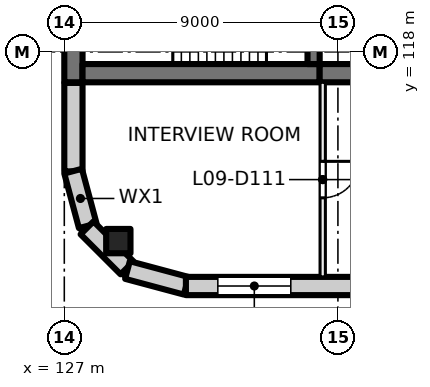
"""IFC4 building model, lengths in metres.
Left out: names, types, materials, properties, quantities, classifications, styles, units other than length and angle.
Written with IfcOpenShell. Run it as: python <this file> out.ifc"""

import sys

from ifc_helpers import new_model, si_unit, direction, frame, frame_2d, origin, origin_2d, place, context, subcontext, project, spatial, rectangle, extrude, element, fill, save


model = new_model("IFC4")
c1 = context("Model", 3, precision=1e-05, world=origin(), true_north=direction((0.0, 1.0)))
c2 = subcontext(c1, "Body", "Model", "MODEL_VIEW")
j1 = project(units=[si_unit("LENGTHUNIT", "METRE"), si_unit("PLANEANGLEUNIT", "RADIAN")], contexts=[c1])
p1 = place(None, origin())
s1 = spatial("IfcSite", under=j1, at=p1, CompositionType="ELEMENT")
p2 = place(p1, origin())
s2 = spatial("IfcBuilding", under=s1, at=p2, CompositionType="ELEMENT")
p3 = place(p2, frame((0.0, 0.0, 43.5)))
s3 = spatial("IfcBuildingStorey", under=s2, at=p3, CompositionType="ELEMENT", Elevation=43.5)
p4 = place(p3, frame((128.777, 111.777, 0.0), z_axis=(0.0, 0.0, 1.0), x_axis=(1.0, 0.0, 0.0)))
e1 = element("IfcColumn", 1, at=p4, inside=s3, PredefinedType="COLUMN", context=c2, shape_type="SweptSolid", body=[
    extrude(rectangle(XDim=0.8, YDim=0.8, at=origin_2d()), origin(), (0.0, 0.0, 1.0), 4.0),
])
p5 = place(p3, frame((127.3, 117.0, 0.0), z_axis=(0.0, 0.0, 1.0), x_axis=(0.0, 1.0, 0.0)))
e2 = element("IfcWall", 2, at=p5, inside=s3, PredefinedType="SHEAR", context=c2, shape_type="SweptSolid", body=[
    extrude(rectangle(XDim=3.8, YDim=0.6, at=frame_2d((1.9, 0.0))), origin(), (0.0, 0.0, 1.0), 4.0),
])
p6 = place(p3, frame((127.6, 117.3, 0.0), z_axis=(0.0, 0.0, 1.0), x_axis=(1.0, 0.0, 0.0)))
e3 = element("IfcWall", 3, at=p6, inside=s3, PredefinedType="SHEAR", context=c2, shape_type="SweptSolid", body=[
    extrude(rectangle(XDim=7.8, YDim=0.6, at=frame_2d((3.9, 0.0))), origin(), (0.0, 0.0, 1.0), 4.0),
])
p7 = place(p3, frame((135.4, 117.3, 0.0), z_axis=(0.0, 0.0, 1.0), x_axis=(1.0, 0.0, 0.0)))
e4 = element("IfcWall", 4, at=p7, inside=s3, PredefinedType="SHEAR", context=c2, shape_type="SweptSolid", body=[
    extrude(rectangle(XDim=4.6, YDim=0.6, at=frame_2d((2.3, 0.0))), origin(), (0.0, 0.0, 1.0), 4.0),
])
p8 = place(p3, frame((135.2, 117.6, 0.0), z_axis=(0.0, 0.0, 1.0), x_axis=(0.0, 1.0, 0.0)))
e5 = element("IfcWall", 5, at=p8, inside=s3, PredefinedType="SHEAR", context=c2, shape_type="SweptSolid", body=[
    extrude(rectangle(XDim=2.8, YDim=0.4, at=frame_2d((1.4, 0.0))), origin(), (0.0, 0.0, 1.0), 4.0),
])
p9 = place(p8, frame((0.9, 0.0, 0.0)))
e6 = element("IfcOpeningElement", 6, at=p9, cuts=e5, PredefinedType="OPENING", context=c2, shape_type="SweptSolid", body=[
    extrude(rectangle(XDim=1.0, YDim=2.1, at=frame_2d((0.5, 1.05))), frame((0.0, 0.21, 0.0), z_axis=(0.0, -1.0, 0.0), x_axis=(1.0, 0.0, 0.0)), (0.0, 0.0, 1.0), 0.42),
])
p10 = place(p3, frame((127.3, 114.07, 0.0), z_axis=(0.0, 0.0, 1.0), x_axis=(0.0, 1.0, 0.0)))
e7 = element("IfcWall", 7, at=p10, inside=s3, PredefinedType="SOLIDWALL", context=c2, shape_type="SweptSolid", body=[
    extrude(rectangle(XDim=2.91, YDim=0.6, at=frame_2d((1.455, 0.0))), origin(), (0.0, 0.0, 1.0), 3.625),
])
for number, where, z_axis, x_axis in (
    (8, (127.771, 112.281, 0.0), (0.0, 0.0, 1.0), (-0.259, 0.966, 0.0)),
    (9, (129.064, 110.896, 0.0), (0.0, 0.0, 1.0), (-0.707, 0.707, 0.0)),
):
    element("IfcWall", number, at=place(p3, frame(where, z_axis=z_axis, x_axis=x_axis)), inside=s3, PredefinedType="SOLIDWALL", context=c2, shape_type="SweptSolid", body=[
        extrude(rectangle(XDim=1.861, YDim=0.6, at=frame_2d((0.93, 0.0))), origin(), (0.0, 0.0, 1.0), 3.625),
    ])
p11 = place(p3, frame((131.01, 110.308, 0.0), z_axis=(0.0, 0.0, 1.0), x_axis=(-0.965920269068, 0.258839784042, 0.0)))
e10 = element("IfcWall", 10, at=p11, inside=s3, PredefinedType="SOLIDWALL", context=c2, shape_type="SweptSolid", body=[
    extrude(rectangle(XDim=2.0, YDim=0.6, at=frame_2d((1.0, 0.0))), origin(), (0.0, 0.0, 1.0), 3.625),
])
p12 = place(p3, frame((162.93, 110.3, 0.0), z_axis=(0.0, 0.0, 1.0), x_axis=(-1.0, 0.0, 0.0)))
e11 = element("IfcWall", 11, at=p12, inside=s3, PredefinedType="SOLIDWALL", context=c2, shape_type="SweptSolid", body=[
    extrude(rectangle(XDim=31.93, YDim=0.6, at=frame_2d((15.965, 0.0))), origin(), (0.0, 0.0, 1.0), 3.625),
])
p13 = place(p12, frame((1.48, 0.0, 0.9)))
e12 = element("IfcOpeningElement", 12, at=p13, cuts=e11, PredefinedType="OPENING", context=c2, shape_type="SweptSolid", body=[
    extrude(rectangle(XDim=2.4, YDim=2.4, at=frame_2d((1.2, 1.2))), frame((0.0, 0.31, 0.0), z_axis=(0.0, -1.0, 0.0), x_axis=(1.0, 0.0, 0.0)), (0.0, 0.0, 1.0), 0.62),
])
p14 = place(p12, frame((5.98, 0.0, 0.9)))
e13 = element("IfcOpeningElement", 13, at=p14, cuts=e11, PredefinedType="OPENING", context=c2, shape_type="SweptSolid", body=[
    extrude(rectangle(XDim=2.4, YDim=2.4, at=frame_2d((1.2, 1.2))), frame((0.0, 0.31, 0.0), z_axis=(0.0, -1.0, 0.0), x_axis=(1.0, 0.0, 0.0)), (0.0, 0.0, 1.0), 0.62),
])
p15 = place(p12, frame((10.48, 0.0, 0.9)))
e14 = element("IfcOpeningElement", 14, at=p15, cuts=e11, PredefinedType="OPENING", context=c2, shape_type="SweptSolid", body=[
    extrude(rectangle(XDim=2.4, YDim=2.4, at=frame_2d((1.2, 1.2))), frame((0.0, 0.31, 0.0), z_axis=(0.0, -1.0, 0.0), x_axis=(1.0, 0.0, 0.0)), (0.0, 0.0, 1.0), 0.62),
])
p16 = place(p12, frame((14.98, 0.0, 0.9)))
e15 = element("IfcOpeningElement", 15, at=p16, cuts=e11, PredefinedType="OPENING", context=c2, shape_type="SweptSolid", body=[
    extrude(rectangle(XDim=2.4, YDim=2.4, at=frame_2d((1.2, 1.2))), frame((0.0, 0.31, 0.0), z_axis=(0.0, -1.0, 0.0), x_axis=(1.0, 0.0, 0.0)), (0.0, 0.0, 1.0), 0.62),
])
p17 = place(p12, frame((19.48, 0.0, 0.9)))
e16 = element("IfcOpeningElement", 16, at=p17, cuts=e11, PredefinedType="OPENING", context=c2, shape_type="SweptSolid", body=[
    extrude(rectangle(XDim=2.4, YDim=2.4, at=frame_2d((1.2, 1.2))), frame((0.0, 0.31, 0.0), z_axis=(0.0, -1.0, 0.0), x_axis=(1.0, 0.0, 0.0)), (0.0, 0.0, 1.0), 0.62),
])
p18 = place(p12, frame((23.98, 0.0, 0.9)))
e17 = element("IfcOpeningElement", 17, at=p18, cuts=e11, PredefinedType="OPENING", context=c2, shape_type="SweptSolid", body=[
    extrude(rectangle(XDim=2.4, YDim=2.4, at=frame_2d((1.2, 1.2))), frame((0.0, 0.31, 0.0), z_axis=(0.0, -1.0, 0.0), x_axis=(1.0, 0.0, 0.0)), (0.0, 0.0, 1.0), 0.62),
])
p19 = place(p12, frame((28.48, 0.0, 0.9)))
e18 = element("IfcOpeningElement", 18, at=p19, cuts=e11, PredefinedType="OPENING", context=c2, shape_type="SweptSolid", body=[
    extrude(rectangle(XDim=2.4, YDim=2.4, at=frame_2d((1.2, 1.2))), frame((0.0, 0.31, 0.0), z_axis=(0.0, -1.0, 0.0), x_axis=(1.0, 0.0, 0.0)), (0.0, 0.0, 1.0), 0.62),
])
p20 = place(p3, frame((135.5, 117.0, 0.0), z_axis=(0.0, 0.0, 1.0), x_axis=(0.0, -1.0, 0.0)))
e19 = element("IfcWall", 19, at=p20, inside=s3, PredefinedType="PARTITIONING", context=c2, shape_type="SweptSolid", body=[
    extrude(rectangle(XDim=6.4, YDim=0.175, at=frame_2d((3.2, 0.0))), origin(), (0.0, 0.0, 1.0), 3.625),
])
p21 = place(p20, frame((2.6, 0.0, 0.0)))
e20 = element("IfcOpeningElement", 20, at=p21, cuts=e19, PredefinedType="OPENING", context=c2, shape_type="SweptSolid", body=[
    extrude(rectangle(XDim=1.2, YDim=2.1, at=frame_2d((0.6, 1.05))), frame((0.0, 0.097, 0.0), z_axis=(0.0, -1.0, 0.0), x_axis=(1.0, 0.0, 0.0)), (0.0, 0.0, 1.0), 0.195),
])
p22 = place(p19, origin())
e21 = element("IfcWindow", 21, at=p22, inside=s3, PartitioningType="SINGLE_PANEL", PredefinedType="WINDOW", context=c2, shape_type="SweptSolid", body=[
    extrude(rectangle(XDim=2.4, YDim=2.4, at=frame_2d((1.2, 1.2))), frame((0.0, 0.03, 0.0), z_axis=(0.0, -1.0, 0.0), x_axis=(1.0, 0.0, 0.0)), (0.0, 0.0, 1.0), 0.06),
])
fill(e18, e21)
p23 = place(p21, origin())
e22 = element("IfcDoor", 22, at=p23, inside=s3, OperationType="DOUBLE_DOOR_SINGLE_SWING", PredefinedType="DOOR", context=c2, shape_type="SweptSolid", body=[
    extrude(rectangle(XDim=1.2, YDim=2.1, at=frame_2d((0.6, 1.05))), frame((0.0, 0.025, 0.0), z_axis=(0.0, -1.0, 0.0), x_axis=(1.0, 0.0, 0.0)), (0.0, 0.0, 1.0), 0.05),
])
fill(e20, e22)
save(model, sys.argv[1])
